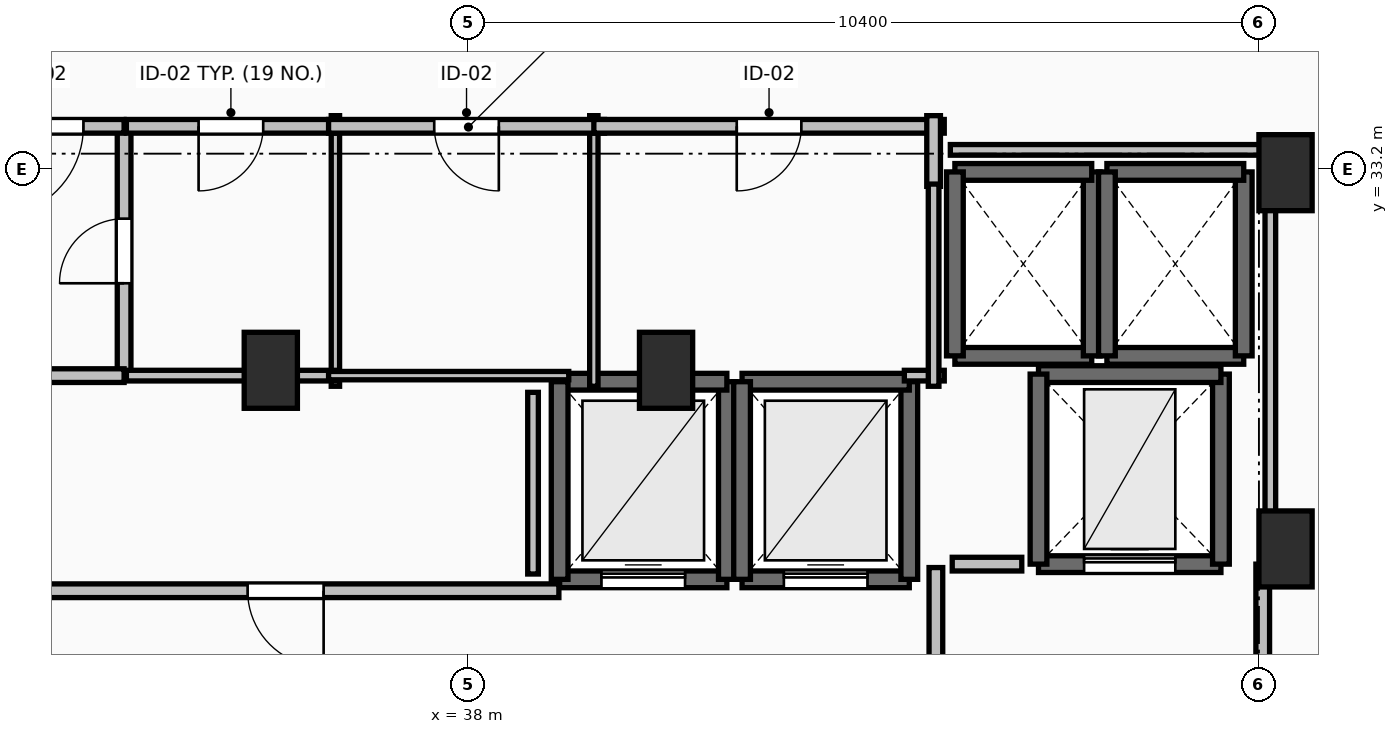
"""IFC4 building model, lengths in metres.
Left out: names, types, materials, properties, quantities, classifications, styles, units other than length and angle.
Written with IfcOpenShell. Run it as: python <this file> out.ifc"""

import sys

from ifc_helpers import new_model, si_unit, direction, frame, frame_2d, origin, origin_2d, place, context, subcontext, project, spatial, rectangle, extrude, element, fill, save


model = new_model("IFC4")
c1 = context("Model", 3, precision=1e-05, world=origin(), true_north=direction((0.0, 1.0)))
c2 = subcontext(c1, "Body", "Model", "MODEL_VIEW")
j1 = project(units=[si_unit("LENGTHUNIT", "METRE"), si_unit("PLANEANGLEUNIT", "RADIAN")], contexts=[c1])
p1 = place(None, origin())
s1 = spatial("IfcSite", under=j1, at=p1, CompositionType="ELEMENT")
p2 = place(p1, origin())
s2 = spatial("IfcBuilding", under=s1, at=p2, CompositionType="ELEMENT")
p3 = place(p2, frame((0.0, 0.0, 252.0)))
s3 = spatial("IfcBuildingStorey", under=s2, at=p3, CompositionType="ELEMENT", Elevation=252.0)
for number, where, z_axis, x_axis in (
    (1, (48.75, 33.15, 0.0), (0.0, 0.0, 1.0), (1.0, 0.0, 0.0)),
    (2, (48.75, 28.2, 0.0), (0.0, 0.0, 1.0), (1.0, 0.0, 0.0)),
    (3, (35.4, 30.55, 0.0), (0.0, 0.0, 1.0), (1.0, 0.0, 0.0)),
    (4, (40.6, 30.55, 0.0), (0.0, 0.0, 1.0), (1.0, 0.0, 0.0)),
):
    element("IfcColumn", number, at=place(p3, frame(where, z_axis=z_axis, x_axis=x_axis)), inside=s3, PredefinedType="PILASTER", context=c2, shape_type="SweptSolid", body=[
        extrude(rectangle(XDim=0.7, YDim=1.0, at=origin_2d()), origin(), (0.0, 0.0, 1.0), 3.55),
    ])
p4 = place(p3, frame((39.2, 27.8, 0.0), z_axis=(0.0, 0.0, 1.0), x_axis=(1.0, 0.0, 0.0)))
e5 = element("IfcWall", 5, at=p4, inside=s3, PredefinedType="SOLIDWALL", context=c2, shape_type="SweptSolid", body=[
    extrude(rectangle(XDim=2.2, YDim=0.22, at=frame_2d((1.1, 0.0))), origin(), (0.0, 0.0, 1.0), 3.29),
])
p5 = place(p4, frame((0.55, 0.0, 0.0)))
e6 = element("IfcOpeningElement", 6, at=p5, cuts=e5, PredefinedType="OPENING", context=c2, shape_type="SweptSolid", body=[
    extrude(rectangle(XDim=1.1, YDim=2.2, at=frame_2d((0.55, 1.1))), frame((0.0, 0.125, 0.0), z_axis=(0.0, -1.0, 0.0), x_axis=(1.0, 0.0, 0.0)), (0.0, 0.0, 1.0), 0.25),
])
p6 = place(p3, frame((41.4, 27.8, 0.0), z_axis=(0.0, 0.0, 1.0), x_axis=(0.0, 1.0, 0.0)))
e7 = element("IfcWall", 7, at=p6, inside=s3, PredefinedType="SOLIDWALL", context=c2, shape_type="SweptSolid", body=[
    extrude(rectangle(XDim=2.6, YDim=0.22, at=frame_2d((1.3, 0.0))), origin(), (0.0, 0.0, 1.0), 3.29),
])
p7 = place(p3, frame((41.4, 30.4, 0.0), z_axis=(0.0, 0.0, 1.0), x_axis=(-1.0, 0.0, 0.0)))
e8 = element("IfcWall", 8, at=p7, inside=s3, PredefinedType="SOLIDWALL", context=c2, shape_type="SweptSolid", body=[
    extrude(rectangle(XDim=2.2, YDim=0.22, at=frame_2d((1.1, 0.0))), origin(), (0.0, 0.0, 1.0), 3.29),
])
p8 = place(p3, frame((39.2, 30.4, 0.0), z_axis=(0.0, 0.0, 1.0), x_axis=(0.0, -1.0, 0.0)))
e9 = element("IfcWall", 9, at=p8, inside=s3, PredefinedType="SOLIDWALL", context=c2, shape_type="SweptSolid", body=[
    extrude(rectangle(XDim=2.6, YDim=0.22, at=frame_2d((1.3, 0.0))), origin(), (0.0, 0.0, 1.0), 3.29),
])
p9 = place(p3, frame((41.6, 27.8, 0.0), z_axis=(0.0, 0.0, 1.0), x_axis=(1.0, 0.0, 0.0)))
e10 = element("IfcWall", 10, at=p9, inside=s3, PredefinedType="SOLIDWALL", context=c2, shape_type="SweptSolid", body=[
    extrude(rectangle(XDim=2.2, YDim=0.22, at=frame_2d((1.1, 0.0))), origin(), (0.0, 0.0, 1.0), 3.29),
])
p10 = place(p9, frame((0.55, 0.0, 0.0)))
e11 = element("IfcOpeningElement", 11, at=p10, cuts=e10, PredefinedType="OPENING", context=c2, shape_type="SweptSolid", body=[
    extrude(rectangle(XDim=1.1, YDim=2.2, at=frame_2d((0.55, 1.1))), frame((0.0, 0.125, 0.0), z_axis=(0.0, -1.0, 0.0), x_axis=(1.0, 0.0, 0.0)), (0.0, 0.0, 1.0), 0.25),
])
p11 = place(p3, frame((43.8, 27.8, 0.0), z_axis=(0.0, 0.0, 1.0), x_axis=(0.0, 1.0, 0.0)))
e12 = element("IfcWall", 12, at=p11, inside=s3, PredefinedType="SOLIDWALL", context=c2, shape_type="SweptSolid", body=[
    extrude(rectangle(XDim=2.6, YDim=0.22, at=frame_2d((1.3, 0.0))), origin(), (0.0, 0.0, 1.0), 3.29),
])
p12 = place(p3, frame((43.8, 30.4, 0.0), z_axis=(0.0, 0.0, 1.0), x_axis=(-1.0, 0.0, 0.0)))
e13 = element("IfcWall", 13, at=p12, inside=s3, PredefinedType="SOLIDWALL", context=c2, shape_type="SweptSolid", body=[
    extrude(rectangle(XDim=2.2, YDim=0.22, at=frame_2d((1.1, 0.0))), origin(), (0.0, 0.0, 1.0), 3.29),
])
p13 = place(p3, frame((41.6, 30.4, 0.0), z_axis=(0.0, 0.0, 1.0), x_axis=(0.0, -1.0, 0.0)))
e14 = element("IfcWall", 14, at=p13, inside=s3, PredefinedType="SOLIDWALL", context=c2, shape_type="SweptSolid", body=[
    extrude(rectangle(XDim=2.6, YDim=0.22, at=frame_2d((1.3, 0.0))), origin(), (0.0, 0.0, 1.0), 3.29),
])
p14 = place(p3, frame((44.4, 30.74, 0.0), z_axis=(0.0, 0.0, 1.0), x_axis=(1.0, 0.0, 0.0)))
e15 = element("IfcWall", 15, at=p14, inside=s3, PredefinedType="SOLIDWALL", context=c2, shape_type="SweptSolid", body=[
    extrude(rectangle(XDim=1.8, YDim=0.22, at=frame_2d((0.9, 0.0))), origin(), (0.0, 0.0, 1.0), 3.29),
])
p15 = place(p3, frame((46.2, 30.74, 0.0), z_axis=(0.0, 0.0, 1.0), x_axis=(0.0, 1.0, 0.0)))
e16 = element("IfcWall", 16, at=p15, inside=s3, PredefinedType="SOLIDWALL", context=c2, shape_type="SweptSolid", body=[
    extrude(rectangle(XDim=2.42, YDim=0.22, at=frame_2d((1.21, 0.0))), origin(), (0.0, 0.0, 1.0), 3.29),
])
p16 = place(p3, frame((46.2, 33.16, 0.0), z_axis=(0.0, 0.0, 1.0), x_axis=(-1.0, 0.0, 0.0)))
e17 = element("IfcWall", 17, at=p16, inside=s3, PredefinedType="SOLIDWALL", context=c2, shape_type="SweptSolid", body=[
    extrude(rectangle(XDim=1.8, YDim=0.22, at=frame_2d((0.9, 0.0))), origin(), (0.0, 0.0, 1.0), 3.29),
])
p17 = place(p3, frame((44.4, 33.16, 0.0), z_axis=(0.0, 0.0, 1.0), x_axis=(0.0, -1.0, 0.0)))
e18 = element("IfcWall", 18, at=p17, inside=s3, PredefinedType="SOLIDWALL", context=c2, shape_type="SweptSolid", body=[
    extrude(rectangle(XDim=2.42, YDim=0.22, at=frame_2d((1.21, 0.0))), origin(), (0.0, 0.0, 1.0), 3.29),
])
p18 = place(p3, frame((46.4, 30.74, 0.0), z_axis=(0.0, 0.0, 1.0), x_axis=(1.0, 0.0, 0.0)))
e19 = element("IfcWall", 19, at=p18, inside=s3, PredefinedType="SOLIDWALL", context=c2, shape_type="SweptSolid", body=[
    extrude(rectangle(XDim=1.8, YDim=0.22, at=frame_2d((0.9, 0.0))), origin(), (0.0, 0.0, 1.0), 3.29),
])
p19 = place(p3, frame((48.2, 30.74, 0.0), z_axis=(0.0, 0.0, 1.0), x_axis=(0.0, 1.0, 0.0)))
e20 = element("IfcWall", 20, at=p19, inside=s3, PredefinedType="SOLIDWALL", context=c2, shape_type="SweptSolid", body=[
    extrude(rectangle(XDim=2.42, YDim=0.22, at=frame_2d((1.21, 0.0))), origin(), (0.0, 0.0, 1.0), 3.29),
])
p20 = place(p3, frame((48.2, 33.16, 0.0), z_axis=(0.0, 0.0, 1.0), x_axis=(-1.0, 0.0, 0.0)))
e21 = element("IfcWall", 21, at=p20, inside=s3, PredefinedType="SOLIDWALL", context=c2, shape_type="SweptSolid", body=[
    extrude(rectangle(XDim=1.8, YDim=0.22, at=frame_2d((0.9, 0.0))), origin(), (0.0, 0.0, 1.0), 3.29),
])
p21 = place(p3, frame((46.4, 33.16, 0.0), z_axis=(0.0, 0.0, 1.0), x_axis=(0.0, -1.0, 0.0)))
e22 = element("IfcWall", 22, at=p21, inside=s3, PredefinedType="SOLIDWALL", context=c2, shape_type="SweptSolid", body=[
    extrude(rectangle(XDim=2.42, YDim=0.22, at=frame_2d((1.21, 0.0))), origin(), (0.0, 0.0, 1.0), 3.29),
])
p22 = place(p3, frame((45.5, 28.0, 0.0), z_axis=(0.0, 0.0, 1.0), x_axis=(1.0, 0.0, 0.0)))
e23 = element("IfcWall", 23, at=p22, inside=s3, PredefinedType="SHEAR", context=c2, shape_type="SweptSolid", body=[
    extrude(rectangle(XDim=2.4, YDim=0.22, at=frame_2d((1.2, 0.0))), origin(), (0.0, 0.0, 1.0), 3.29),
])
p23 = place(p22, frame((0.6, 0.0, 0.0)))
e24 = element("IfcOpeningElement", 24, at=p23, cuts=e23, PredefinedType="OPENING", context=c2, shape_type="SweptSolid", body=[
    extrude(rectangle(XDim=1.2, YDim=2.2, at=frame_2d((0.6, 1.1))), frame((0.0, 0.125, 0.0), z_axis=(0.0, -1.0, 0.0), x_axis=(1.0, 0.0, 0.0)), (0.0, 0.0, 1.0), 0.25),
])
p24 = place(p3, frame((47.9, 28.0, 0.0), z_axis=(0.0, 0.0, 1.0), x_axis=(0.0, 1.0, 0.0)))
e25 = element("IfcWall", 25, at=p24, inside=s3, PredefinedType="SHEAR", context=c2, shape_type="SweptSolid", body=[
    extrude(rectangle(XDim=2.5, YDim=0.22, at=frame_2d((1.25, 0.0))), origin(), (0.0, 0.0, 1.0), 3.29),
])
p25 = place(p3, frame((47.9, 30.5, 0.0), z_axis=(0.0, 0.0, 1.0), x_axis=(-1.0, 0.0, 0.0)))
e26 = element("IfcWall", 26, at=p25, inside=s3, PredefinedType="SHEAR", context=c2, shape_type="SweptSolid", body=[
    extrude(rectangle(XDim=2.4, YDim=0.22, at=frame_2d((1.2, 0.0))), origin(), (0.0, 0.0, 1.0), 3.29),
])
p26 = place(p3, frame((45.5, 30.5, 0.0), z_axis=(0.0, 0.0, 1.0), x_axis=(0.0, -1.0, 0.0)))
e27 = element("IfcWall", 27, at=p26, inside=s3, PredefinedType="SHEAR", context=c2, shape_type="SweptSolid", body=[
    extrude(rectangle(XDim=2.5, YDim=0.22, at=frame_2d((1.25, 0.0))), origin(), (0.0, 0.0, 1.0), 3.29),
])
p27 = place(p3, frame((44.15, 27.955, 0.0), z_axis=(0.0, 0.0, 1.0), x_axis=(0.0, -1.0, 0.0)))
e28 = element("IfcWall", 28, at=p27, inside=s3, PredefinedType="PARTITIONING", context=c2, shape_type="SweptSolid", body=[
    extrude(rectangle(XDim=3.91, YDim=0.18, at=frame_2d((1.955, 0.0))), origin(), (0.0, 0.0, 1.0), 3.29),
])
p28 = place(p27, frame((1.355, 0.0, 0.0)))
e29 = element("IfcOpeningElement", 29, at=p28, cuts=e28, PredefinedType="OPENING", context=c2, shape_type="SweptSolid", body=[
    extrude(rectangle(XDim=1.2, YDim=2.15, at=frame_2d((0.6, 1.075))), frame((0.0, 0.105, 0.0), z_axis=(0.0, -1.0, 0.0), x_axis=(1.0, 0.0, 0.0)), (0.0, 0.0, 1.0), 0.21),
])
p29 = place(p3, frame((48.45, 23.95, 0.0), z_axis=(0.0, 0.0, 1.0), x_axis=(0.0, 1.0, 0.0)))
e30 = element("IfcWall", 30, at=p29, inside=s3, PredefinedType="PARTITIONING", context=c2, shape_type="SweptSolid", body=[
    extrude(rectangle(XDim=4.05, YDim=0.18, at=frame_2d((2.025, 0.0))), origin(), (0.0, 0.0, 1.0), 3.29),
])
p30 = place(p29, frame((1.425, 0.0, 0.0)))
e31 = element("IfcOpeningElement", 31, at=p30, cuts=e30, PredefinedType="OPENING", context=c2, shape_type="SweptSolid", body=[
    extrude(rectangle(XDim=1.2, YDim=2.15, at=frame_2d((0.6, 1.075))), frame((0.0, 0.105, 0.0), z_axis=(0.0, -1.0, 0.0), x_axis=(1.0, 0.0, 0.0)), (0.0, 0.0, 1.0), 0.21),
])
p31 = place(p3, frame((33.47, 30.48, 0.0), z_axis=(0.0, 0.0, 1.0), x_axis=(0.0, 1.0, 0.0)))
e32 = element("IfcWall", 32, at=p31, inside=s3, PredefinedType="PARTITIONING", context=c2, shape_type="SweptSolid", body=[
    extrude(rectangle(XDim=3.28, YDim=0.18, at=frame_2d((1.64, 0.0))), origin(), (0.0, 0.0, 1.0), 3.29),
])
p32 = place(p31, frame((1.215, 0.0, 0.0)))
e33 = element("IfcOpeningElement", 33, at=p32, cuts=e32, PredefinedType="OPENING", context=c2, shape_type="SweptSolid", body=[
    extrude(rectangle(XDim=0.85, YDim=2.1, at=frame_2d((0.425, 1.05))), frame((0.0, 0.105, 0.0), z_axis=(0.0, -1.0, 0.0), x_axis=(1.0, 0.0, 0.0)), (0.0, 0.0, 1.0), 0.21),
])
p33 = place(p3, frame((31.87, 30.48, 0.0), z_axis=(0.0, 0.0, 1.0), x_axis=(1.0, 0.0, 0.0)))
e34 = element("IfcWall", 34, at=p33, inside=s3, PredefinedType="PARTITIONING", context=c2, shape_type="SweptSolid", body=[
    extrude(rectangle(XDim=1.6, YDim=0.18, at=frame_2d((0.8, 0.0))), origin(), (0.0, 0.0, 1.0), 3.29),
])
p34 = place(p3, frame((33.47, 33.76, 0.0), z_axis=(0.0, 0.0, 1.0), x_axis=(-1.0, 0.0, 0.0)))
e35 = element("IfcWall", 35, at=p34, inside=s3, PredefinedType="PARTITIONING", context=c2, shape_type="SweptSolid", body=[
    extrude(rectangle(XDim=2.27, YDim=0.18, at=frame_2d((1.135, 0.0))), origin(), (0.0, 0.0, 1.0), 3.29),
])
p35 = place(p34, frame((0.535, 0.0, 0.0)))
e36 = element("IfcOpeningElement", 36, at=p35, cuts=e35, PredefinedType="OPENING", context=c2, shape_type="SweptSolid", body=[
    extrude(rectangle(XDim=1.2, YDim=2.15, at=frame_2d((0.6, 1.075))), frame((0.0, 0.105, 0.0), z_axis=(0.0, -1.0, 0.0), x_axis=(1.0, 0.0, 0.0)), (0.0, 0.0, 1.0), 0.21),
])
p36 = place(p3, frame((39.19, 27.65, 0.0), z_axis=(0.0, 0.0, 1.0), x_axis=(-1.0, 0.0, 0.0)))
e37 = element("IfcWall", 37, at=p36, inside=s3, PredefinedType="PARTITIONING", context=c2, shape_type="SweptSolid", body=[
    extrude(rectangle(XDim=7.19, YDim=0.18, at=frame_2d((3.595, 0.0))), origin(), (0.0, 0.0, 1.0), 3.29),
])
p37 = place(p36, frame((3.095, 0.0, 0.0)))
e38 = element("IfcOpeningElement", 38, at=p37, cuts=e37, PredefinedType="OPENING", context=c2, shape_type="SweptSolid", body=[
    extrude(rectangle(XDim=1.0, YDim=2.15, at=frame_2d((0.5, 1.075))), frame((0.0, 0.105, 0.0), z_axis=(0.0, -1.0, 0.0), x_axis=(1.0, 0.0, 0.0)), (0.0, 0.0, 1.0), 0.21),
])
p38 = place(p3, frame((36.25, 30.34, 0.0), z_axis=(0.0, 0.0, 1.0), x_axis=(0.0, 1.0, 0.0)))
e39 = element("IfcWall", 39, at=p38, inside=s3, PredefinedType="PARTITIONING", context=c2, shape_type="SweptSolid", body=[
    extrude(rectangle(XDim=3.56, YDim=0.11, at=frame_2d((1.78, 0.0))), origin(), (0.0, 0.0, 1.0), 2.482),
])
p39 = place(p3, frame((33.5, 30.48, 0.0), z_axis=(0.0, 0.0, 1.0), x_axis=(1.0, 0.0, 0.0)))
e40 = element("IfcWall", 40, at=p39, inside=s3, PredefinedType="PARTITIONING", context=c2, shape_type="SweptSolid", body=[
    extrude(rectangle(XDim=2.75, YDim=0.14, at=frame_2d((1.375, 0.0))), origin(), (0.0, 0.0, 1.0), 2.482),
])
p40 = place(p3, frame((36.25, 33.76, 0.0), z_axis=(0.0, 0.0, 1.0), x_axis=(-1.0, 0.0, 0.0)))
e41 = element("IfcWall", 41, at=p40, inside=s3, PredefinedType="PARTITIONING", context=c2, shape_type="SweptSolid", body=[
    extrude(rectangle(XDim=2.75, YDim=0.18, at=frame_2d((1.375, 0.0))), origin(), (0.0, 0.0, 1.0), 3.29),
])
p41 = place(p40, frame((0.95, 0.0, 0.0)))
e42 = element("IfcOpeningElement", 42, at=p41, cuts=e41, PredefinedType="OPENING", context=c2, shape_type="SweptSolid", body=[
    extrude(rectangle(XDim=0.85, YDim=2.1, at=frame_2d((0.425, 1.05))), frame((0.0, 0.105, 0.0), z_axis=(0.0, -1.0, 0.0), x_axis=(1.0, 0.0, 0.0)), (0.0, 0.0, 1.0), 0.21),
])
p42 = place(p3, frame((39.65, 30.34, 0.0), z_axis=(0.0, 0.0, 1.0), x_axis=(0.0, 1.0, 0.0)))
e43 = element("IfcWall", 43, at=p42, inside=s3, PredefinedType="PARTITIONING", context=c2, shape_type="SweptSolid", body=[
    extrude(rectangle(XDim=3.56, YDim=0.11, at=frame_2d((1.78, 0.0))), origin(), (0.0, 0.0, 1.0), 2.482),
])
p43 = place(p3, frame((36.16, 30.48, 0.0), z_axis=(0.0, 0.0, 1.0), x_axis=(1.0, 0.0, 0.0)))
e44 = element("IfcWall", 44, at=p43, inside=s3, PredefinedType="PARTITIONING", context=c2, shape_type="SweptSolid", body=[
    extrude(rectangle(XDim=3.16, YDim=0.11, at=frame_2d((1.58, 0.0))), origin(), (0.0, 0.0, 1.0), 2.482),
])
p44 = place(p3, frame((39.79, 33.76, 0.0), z_axis=(0.0, 0.0, 1.0), x_axis=(-1.0, 0.0, 0.0)))
e45 = element("IfcWall", 45, at=p44, inside=s3, PredefinedType="PARTITIONING", context=c2, shape_type="SweptSolid", body=[
    extrude(rectangle(XDim=3.63, YDim=0.18, at=frame_2d((1.815, 0.0))), origin(), (0.0, 0.0, 1.0), 3.29),
])
p45 = place(p44, frame((1.39, 0.0, 0.0)))
e46 = element("IfcOpeningElement", 46, at=p45, cuts=e45, PredefinedType="OPENING", context=c2, shape_type="SweptSolid", body=[
    extrude(rectangle(XDim=0.85, YDim=2.1, at=frame_2d((0.425, 1.05))), frame((0.0, 0.105, 0.0), z_axis=(0.0, -1.0, 0.0), x_axis=(1.0, 0.0, 0.0)), (0.0, 0.0, 1.0), 0.21),
])
p46 = place(p3, frame((44.26, 33.76, 0.0), z_axis=(0.0, 0.0, 1.0), x_axis=(-1.0, 0.0, 0.0)))
e47 = element("IfcWall", 47, at=p46, inside=s3, PredefinedType="PARTITIONING", context=c2, shape_type="SweptSolid", body=[
    extrude(rectangle(XDim=4.61, YDim=0.18, at=frame_2d((2.305, 0.0))), origin(), (0.0, 0.0, 1.0), 3.29),
])
p47 = place(p46, frame((1.88, 0.0, 0.0)))
e48 = element("IfcOpeningElement", 48, at=p47, cuts=e47, PredefinedType="OPENING", context=c2, shape_type="SweptSolid", body=[
    extrude(rectangle(XDim=0.85, YDim=2.1, at=frame_2d((0.425, 1.05))), frame((0.0, 0.105, 0.0), z_axis=(0.0, -1.0, 0.0), x_axis=(1.0, 0.0, 0.0)), (0.0, 0.0, 1.0), 0.21),
])
p48 = place(p3, frame((44.12, 32.97, 0.0), z_axis=(0.0, 0.0, 1.0), x_axis=(0.0, 1.0, 0.0)))
e49 = element("IfcWall", 49, at=p48, inside=s3, PredefinedType="PARTITIONING", context=c2, shape_type="SweptSolid", body=[
    extrude(rectangle(XDim=0.93, YDim=0.18, at=frame_2d((0.465, 0.0))), origin(), (0.0, 0.0, 1.0), 3.29),
])
p49 = place(p3, frame((45.28, 28.0, 0.0), z_axis=(0.0, 0.0, 1.0), x_axis=(-1.0, 0.0, 0.0)))
e50 = element("IfcWall", 50, at=p49, inside=s3, PredefinedType="PARTITIONING", context=c2, shape_type="SweptSolid", body=[
    extrude(rectangle(XDim=0.915, YDim=0.18, at=frame_2d((0.458, 0.0))), origin(), (0.0, 0.0, 1.0), 3.29),
])
p50 = place(p3, frame((43.735, 30.48, 0.0), z_axis=(0.0, 0.0, 1.0), x_axis=(1.0, 0.0, 0.0)))
e51 = element("IfcWall", 51, at=p50, inside=s3, PredefinedType="PARTITIONING", context=c2, shape_type="SweptSolid", body=[
    extrude(rectangle(XDim=0.525, YDim=0.14, at=frame_2d((0.262, 0.0))), origin(), (0.0, 0.0, 1.0), 3.29),
])
p51 = place(p3, frame((44.12, 30.34, 0.0), z_axis=(0.0, 0.0, 1.0), x_axis=(0.0, 1.0, 0.0)))
e52 = element("IfcWall", 52, at=p51, inside=s3, PredefinedType="PARTITIONING", context=c2, shape_type="SweptSolid", body=[
    extrude(rectangle(XDim=2.66, YDim=0.14, at=frame_2d((1.33, 0.0))), origin(), (0.0, 0.0, 1.0), 3.29),
])
p52 = place(p3, frame((38.85, 27.87, 0.0), z_axis=(0.0, 0.0, 1.0), x_axis=(0.0, 1.0, 0.0)))
e53 = element("IfcWall", 53, at=p52, inside=s3, PredefinedType="PARTITIONING", context=c2, shape_type="SweptSolid", body=[
    extrude(rectangle(XDim=2.39, YDim=0.14, at=frame_2d((1.195, 0.0))), origin(), (0.0, 0.0, 1.0), 3.29),
])
p53 = place(p3, frame((48.55, 28.196, 0.0), z_axis=(0.0, 0.0, 1.0), x_axis=(0.0, 1.0, 0.0)))
e54 = element("IfcWall", 54, at=p53, inside=s3, PredefinedType="PARTITIONING", context=c2, shape_type="SweptSolid", body=[
    extrude(rectangle(XDim=5.254, YDim=0.14, at=frame_2d((2.627, 0.0))), origin(), (0.0, 0.0, 1.0), 2.482),
])
p54 = place(p3, frame((48.55, 33.45, 0.0), z_axis=(0.0, 0.0, 1.0), x_axis=(-1.0, 0.0, 0.0)))
e55 = element("IfcWall", 55, at=p54, inside=s3, PredefinedType="PARTITIONING", context=c2, shape_type="SweptSolid", body=[
    extrude(rectangle(XDim=4.21, YDim=0.14, at=frame_2d((2.105, 0.0))), origin(), (0.0, 0.0, 1.0), 2.482),
])
p55 = place(p5, origin())
e56 = element("IfcDoor", 56, at=p55, inside=s3, OperationType="SLIDING_TO_LEFT", PredefinedType="DOOR", context=c2, shape_type="SweptSolid", body=[
    extrude(rectangle(XDim=1.1, YDim=2.2, at=frame_2d((0.55, 1.1))), frame((0.0, 0.025, 0.0), z_axis=(0.0, -1.0, 0.0), x_axis=(1.0, 0.0, 0.0)), (0.0, 0.0, 1.0), 0.05),
])
fill(e6, e56)
p56 = place(p10, origin())
e57 = element("IfcDoor", 57, at=p56, inside=s3, OperationType="SLIDING_TO_LEFT", PredefinedType="DOOR", context=c2, shape_type="SweptSolid", body=[
    extrude(rectangle(XDim=1.1, YDim=2.2, at=frame_2d((0.55, 1.1))), frame((0.0, 0.025, 0.0), z_axis=(0.0, -1.0, 0.0), x_axis=(1.0, 0.0, 0.0)), (0.0, 0.0, 1.0), 0.05),
])
fill(e11, e57)
p57 = place(p23, origin())
e58 = element("IfcDoor", 58, at=p57, inside=s3, OperationType="SLIDING_TO_LEFT", PredefinedType="DOOR", context=c2, shape_type="SweptSolid", body=[
    extrude(rectangle(XDim=1.2, YDim=2.2, at=frame_2d((0.6, 1.1))), frame((0.0, 0.025, 0.0), z_axis=(0.0, -1.0, 0.0), x_axis=(1.0, 0.0, 0.0)), (0.0, 0.0, 1.0), 0.05),
])
fill(e24, e58)
p58 = place(p32, origin())
e59 = element("IfcDoor", 59, at=p58, inside=s3, OperationType="SINGLE_SWING_LEFT", PredefinedType="DOOR", context=c2, shape_type="SweptSolid", body=[
    extrude(rectangle(XDim=0.85, YDim=2.1, at=frame_2d((0.425, 1.05))), frame((0.0, 0.025, 0.0), z_axis=(0.0, -1.0, 0.0), x_axis=(1.0, 0.0, 0.0)), (0.0, 0.0, 1.0), 0.05),
])
fill(e33, e59)
p59 = place(p35, origin())
e60 = element("IfcDoor", 60, at=p59, inside=s3, OperationType="SINGLE_SWING_RIGHT", PredefinedType="DOOR", context=c2, shape_type="SweptSolid", body=[
    extrude(rectangle(XDim=1.2, YDim=2.15, at=frame_2d((0.6, 1.075))), frame((0.0, 0.025, 0.0), z_axis=(0.0, -1.0, 0.0), x_axis=(1.0, 0.0, 0.0)), (0.0, 0.0, 1.0), 0.05),
])
fill(e36, e60)
p60 = place(p37, origin())
e61 = element("IfcDoor", 61, at=p60, inside=s3, OperationType="SINGLE_SWING_LEFT", PredefinedType="DOOR", context=c2, shape_type="SweptSolid", body=[
    extrude(rectangle(XDim=1.0, YDim=2.15, at=frame_2d((0.5, 1.075))), frame((0.0, 0.025, 0.0), z_axis=(0.0, -1.0, 0.0), x_axis=(1.0, 0.0, 0.0)), (0.0, 0.0, 1.0), 0.05),
])
fill(e38, e61)
p61 = place(p41, origin())
e62 = element("IfcDoor", 62, at=p61, inside=s3, OperationType="SINGLE_SWING_RIGHT", PredefinedType="DOOR", context=c2, shape_type="SweptSolid", body=[
    extrude(rectangle(XDim=0.85, YDim=2.1, at=frame_2d((0.425, 1.05))), frame((0.0, 0.025, 0.0), z_axis=(0.0, -1.0, 0.0), x_axis=(1.0, 0.0, 0.0)), (0.0, 0.0, 1.0), 0.05),
])
fill(e42, e62)
p62 = place(p45, origin())
e63 = element("IfcDoor", 63, at=p62, inside=s3, OperationType="SINGLE_SWING_LEFT", PredefinedType="DOOR", context=c2, shape_type="SweptSolid", body=[
    extrude(rectangle(XDim=0.85, YDim=2.1, at=frame_2d((0.425, 1.05))), frame((0.0, 0.025, 0.0), z_axis=(0.0, -1.0, 0.0), x_axis=(1.0, 0.0, 0.0)), (0.0, 0.0, 1.0), 0.05),
])
fill(e46, e63)
p63 = place(p47, origin())
e64 = element("IfcDoor", 64, at=p63, inside=s3, OperationType="SINGLE_SWING_RIGHT", PredefinedType="DOOR", context=c2, shape_type="SweptSolid", body=[
    extrude(rectangle(XDim=0.85, YDim=2.1, at=frame_2d((0.425, 1.05))), frame((0.0, 0.025, 0.0), z_axis=(0.0, -1.0, 0.0), x_axis=(1.0, 0.0, 0.0)), (0.0, 0.0, 1.0), 0.05),
])
fill(e48, e64)
save(model, sys.argv[1])
